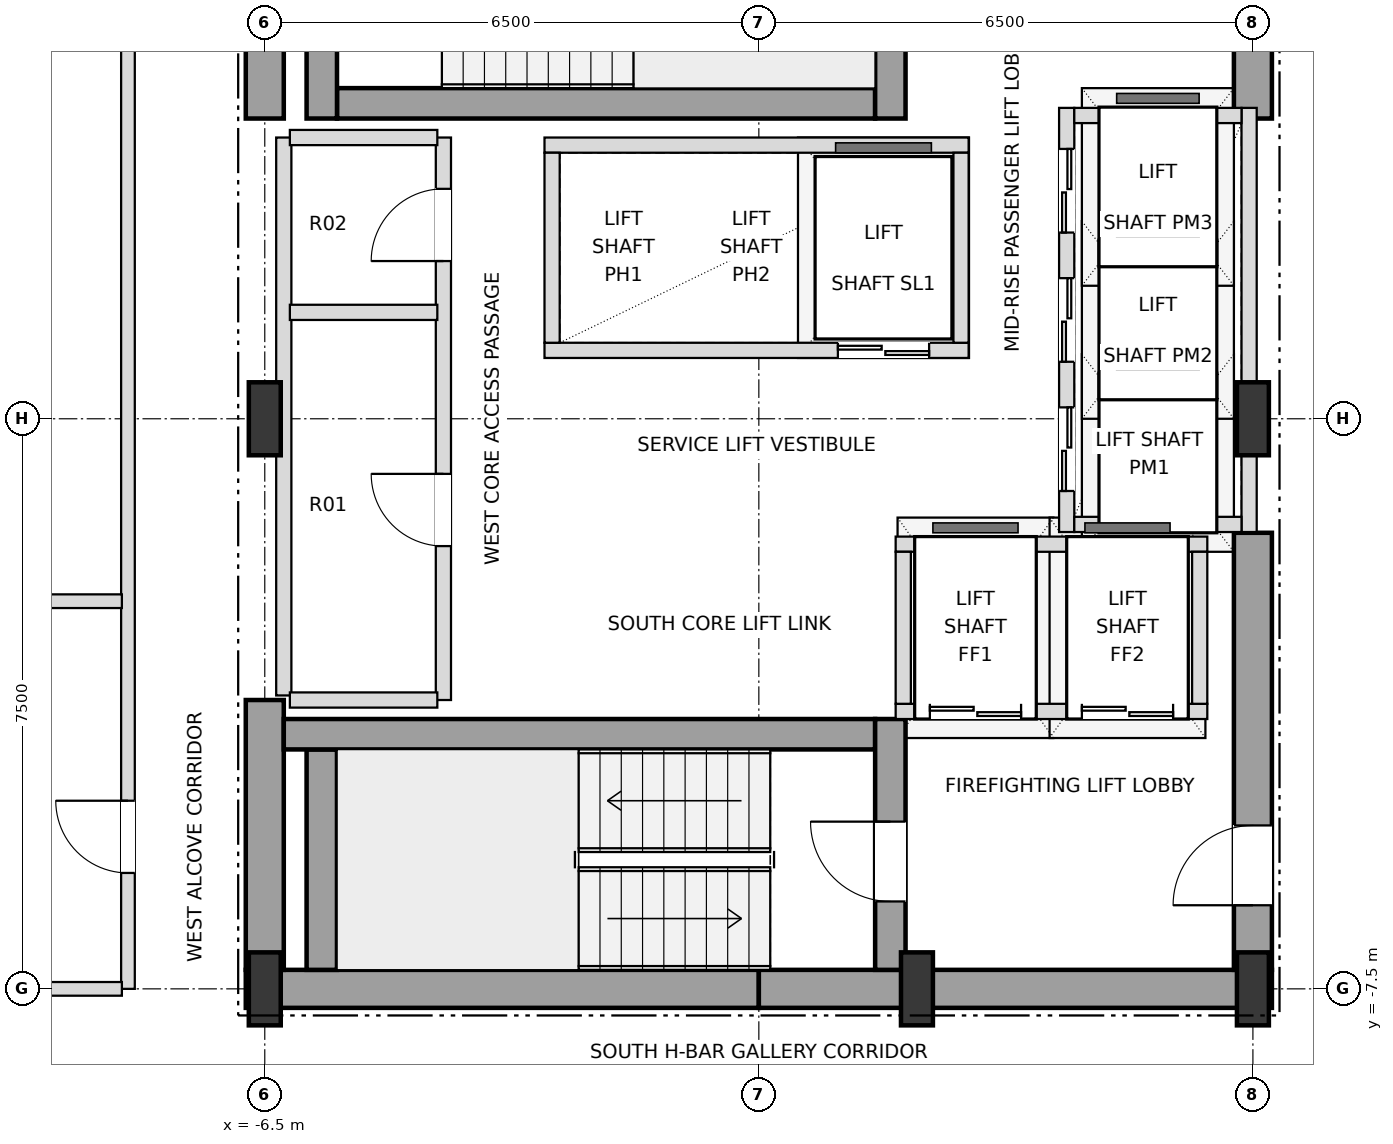
"""IFC4 building model, lengths in metres.
Left out: names, types, materials, properties, quantities, classifications, styles, units other than length and angle.
Written with IfcOpenShell. Run it as: python <this file> out.ifc"""

import sys

from ifc_helpers import new_model, si_unit, direction, frame, frame_2d, origin, origin_2d, place, context, subcontext, project, spatial, rectangle, i_section, extrude, element, fill, save


model = new_model("IFC4")
c1 = context("Model", 3, precision=1e-05, world=origin(), true_north=direction((0.0, 1.0)))
c2 = subcontext(c1, "Body", "Model", "MODEL_VIEW")
j1 = project(units=[si_unit("LENGTHUNIT", "METRE"), si_unit("PLANEANGLEUNIT", "RADIAN")], contexts=[c1])
p1 = place(None, origin())
s1 = spatial("IfcSite", under=j1, at=p1, CompositionType="ELEMENT")
p2 = place(p1, origin())
s2 = spatial("IfcBuilding", under=s1, at=p2, CompositionType="ELEMENT")
p3 = place(p2, frame((0.0, 0.0, 147.6)))
s3 = spatial("IfcBuildingStorey", under=s2, at=p3, CompositionType="ELEMENT", Elevation=147.6)
for number, where, z_axis, x_axis in (
    (1, (-6.5, -7.5, 0.0), (0.0, 0.0, 1.0), (1.0, 0.0, 0.0)),
    (2, (2.08, -7.5, 0.0), (0.0, 0.0, 1.0), (1.0, 0.0, 0.0)),
    (3, (6.5, -7.5, 0.0), (0.0, 0.0, 1.0), (1.0, 0.0, 0.0)),
    (4, (-6.5, 0.0, 0.0), (0.0, 0.0, 1.0), (1.0, 0.0, 0.0)),
    (5, (6.5, 0.0, 0.0), (0.0, 0.0, 1.0), (1.0, 0.0, 0.0)),
):
    element("IfcColumn", number, at=place(p3, frame(where, z_axis=z_axis, x_axis=x_axis)), inside=s3, PredefinedType="COLUMN", context=c2, shape_type="SweptSolid", body=[
        extrude(i_section(OverallWidth=0.42, OverallDepth=0.96, WebThickness=0.022, FlangeThickness=0.034, at=origin_2d()), origin(), (0.0, 0.0, 1.0), 3.6),
    ])
for number, where, z_axis, x_axis in (
    (6, (-6.75, -7.5, 0.0), (0.0, 0.0, 1.0), (1.0, 0.0, 0.0)),
    (7, (0.0, -7.5, 0.0), (0.0, 0.0, 1.0), (1.0, 0.0, 0.0)),
):
    element("IfcWall", number, at=place(p3, frame(where, z_axis=z_axis, x_axis=x_axis)), inside=s3, PredefinedType="SHEAR", context=c2, shape_type="SweptSolid", body=[
        extrude(rectangle(XDim=6.75, YDim=0.5, at=frame_2d((3.375, 0.0))), origin(), (0.0, 0.0, 1.0), 3.38),
    ])
p4 = place(p3, frame((-6.5, -7.25, 0.0), z_axis=(0.0, 0.0, 1.0), x_axis=(0.0, 1.0, 0.0)))
e8 = element("IfcWall", 8, at=p4, inside=s3, PredefinedType="SHEAR", context=c2, shape_type="SweptSolid", body=[
    extrude(rectangle(XDim=3.55, YDim=0.5, at=frame_2d((1.775, 0.0))), origin(), (0.0, 0.0, 1.0), 3.38),
])
p5 = place(p3, frame((-6.5, 3.95, 0.0), z_axis=(0.0, 0.0, 1.0), x_axis=(0.0, 1.0, 0.0)))
e9 = element("IfcWall", 9, at=p5, inside=s3, PredefinedType="SHEAR", context=c2, shape_type="SweptSolid", body=[
    extrude(rectangle(XDim=3.3, YDim=0.5, at=frame_2d((1.65, 0.0))), origin(), (0.0, 0.0, 1.0), 3.38),
])
p6 = place(p3, frame((6.5, -7.25, 0.0), z_axis=(0.0, 0.0, 1.0), x_axis=(0.0, 1.0, 0.0)))
e10 = element("IfcWall", 10, at=p6, inside=s3, PredefinedType="SHEAR", context=c2, shape_type="SweptSolid", body=[
    extrude(rectangle(XDim=5.75, YDim=0.5, at=frame_2d((2.875, 0.0))), origin(), (0.0, 0.0, 1.0), 3.38),
])
p7 = place(p6, frame((0.85, 0.0, 0.0)))
e11 = element("IfcOpeningElement", 11, at=p7, cuts=e10, PredefinedType="OPENING", context=c2, shape_type="SweptSolid", body=[
    extrude(rectangle(XDim=1.05, YDim=2.15, at=frame_2d((0.525, 1.075))), frame((0.0, 0.26, 0.0), z_axis=(0.0, -1.0, 0.0), x_axis=(1.0, 0.0, 0.0)), (0.0, 0.0, 1.0), 0.52),
])
p8 = place(p3, frame((6.5, 3.95, 0.0), z_axis=(0.0, 0.0, 1.0), x_axis=(0.0, 1.0, 0.0)))
e12 = element("IfcWall", 12, at=p8, inside=s3, PredefinedType="SHEAR", context=c2, shape_type="SweptSolid", body=[
    extrude(rectangle(XDim=3.3, YDim=0.5, at=frame_2d((1.65, 0.0))), origin(), (0.0, 0.0, 1.0), 3.38),
])
p9 = place(p3, frame((-5.75, -7.25, 0.0), z_axis=(0.0, 0.0, 1.0), x_axis=(0.0, 1.0, 0.0)))
e13 = element("IfcWall", 13, at=p9, inside=s3, PredefinedType="SHEAR", context=c2, shape_type="SweptSolid", body=[
    extrude(rectangle(XDim=2.9, YDim=0.4, at=frame_2d((1.45, 0.0))), origin(), (0.0, 0.0, 1.0), 3.38),
])
p10 = place(p3, frame((-6.25, -4.15, 0.0), z_axis=(0.0, 0.0, 1.0), x_axis=(1.0, 0.0, 0.0)))
e14 = element("IfcWall", 14, at=p10, inside=s3, PredefinedType="SHEAR", context=c2, shape_type="SweptSolid", body=[
    extrude(rectangle(XDim=7.78, YDim=0.4, at=frame_2d((3.89, 0.0))), origin(), (0.0, 0.0, 1.0), 3.38),
])
p11 = place(p3, frame((1.73, -7.25, 0.0), z_axis=(0.0, 0.0, 1.0), x_axis=(0.0, 1.0, 0.0)))
e15 = element("IfcWall", 15, at=p11, inside=s3, PredefinedType="SHEAR", context=c2, shape_type="SweptSolid", body=[
    extrude(rectangle(XDim=3.3, YDim=0.4, at=frame_2d((1.65, 0.0))), origin(), (0.0, 0.0, 1.0), 3.38),
])
p12 = place(p11, frame((0.9, 0.0, 0.0)))
e16 = element("IfcOpeningElement", 16, at=p12, cuts=e15, PredefinedType="OPENING", context=c2, shape_type="SweptSolid", body=[
    extrude(rectangle(XDim=1.05, YDim=2.15, at=frame_2d((0.525, 1.075))), frame((0.0, 0.21, 0.0), z_axis=(0.0, -1.0, 0.0), x_axis=(1.0, 0.0, 0.0)), (0.0, 0.0, 1.0), 0.42),
])
p13 = place(p3, frame((-5.55, 4.15, 0.0), z_axis=(0.0, 0.0, 1.0), x_axis=(1.0, 0.0, 0.0)))
e17 = element("IfcWall", 17, at=p13, inside=s3, PredefinedType="SHEAR", context=c2, shape_type="SweptSolid", body=[
    extrude(rectangle(XDim=7.08, YDim=0.4, at=frame_2d((3.54, 0.0))), origin(), (0.0, 0.0, 1.0), 3.38),
])
for number, where, z_axis, x_axis in (
    (18, (1.73, 3.95, 0.0), (0.0, 0.0, 1.0), (0.0, 1.0, 0.0)),
    (19, (-5.75, 3.95, 0.0), (0.0, 0.0, 1.0), (0.0, 1.0, 0.0)),
):
    element("IfcWall", number, at=place(p3, frame(where, z_axis=z_axis, x_axis=x_axis)), inside=s3, PredefinedType="SHEAR", context=c2, shape_type="SweptSolid", body=[
        extrude(rectangle(XDim=3.3, YDim=0.4, at=frame_2d((1.65, 0.0))), origin(), (0.0, 0.0, 1.0), 3.38),
    ])
p14 = place(p3, frame((4.05, -1.49, 0.0), z_axis=(0.0, 0.0, 1.0), x_axis=(0.0, 1.0, 0.0)))
e20 = element("IfcWall", 20, at=p14, inside=s3, PredefinedType="SOLIDWALL", context=c2, shape_type="SweptSolid", body=[
    extrude(rectangle(XDim=5.58, YDim=0.2, at=frame_2d((2.79, 0.0))), origin(), (0.0, 0.0, 1.0), 3.38),
])
p15 = place(p14, frame((0.54, 0.0, 0.0)))
e21 = element("IfcOpeningElement", 21, at=p15, cuts=e20, PredefinedType="OPENING", context=c2, shape_type="SweptSolid", body=[
    extrude(rectangle(XDim=1.1, YDim=2.15, at=frame_2d((0.55, 1.075))), frame((0.0, 0.11, 0.0), z_axis=(0.0, -1.0, 0.0), x_axis=(1.0, 0.0, 0.0)), (0.0, 0.0, 1.0), 0.22),
])
p16 = place(p14, frame((2.24, 0.0, 0.0)))
e22 = element("IfcOpeningElement", 22, at=p16, cuts=e20, PredefinedType="OPENING", context=c2, shape_type="SweptSolid", body=[
    extrude(rectangle(XDim=1.1, YDim=2.15, at=frame_2d((0.55, 1.075))), frame((0.0, 0.11, 0.0), z_axis=(0.0, -1.0, 0.0), x_axis=(1.0, 0.0, 0.0)), (0.0, 0.0, 1.0), 0.22),
])
p17 = place(p14, frame((3.94, 0.0, 0.0)))
e23 = element("IfcOpeningElement", 23, at=p17, cuts=e20, PredefinedType="OPENING", context=c2, shape_type="SweptSolid", body=[
    extrude(rectangle(XDim=1.1, YDim=2.15, at=frame_2d((0.55, 1.075))), frame((0.0, 0.11, 0.0), z_axis=(0.0, -1.0, 0.0), x_axis=(1.0, 0.0, 0.0)), (0.0, 0.0, 1.0), 0.22),
])
p18 = place(p3, frame((6.45, -1.49, 0.0), z_axis=(0.0, 0.0, 1.0), x_axis=(0.0, 1.0, 0.0)))
e24 = element("IfcWall", 24, at=p18, inside=s3, PredefinedType="SOLIDWALL", context=c2, shape_type="SweptSolid", body=[
    extrude(rectangle(XDim=5.58, YDim=0.2, at=frame_2d((2.79, 0.0))), origin(), (0.0, 0.0, 1.0), 2.816),
])
for number, where, z_axis, x_axis in (
    (25, (4.15, -1.39, 0.0), (0.0, 0.0, 1.0), (1.0, 0.0, 0.0)),
    (26, (4.15, 3.99, 0.0), (0.0, 0.0, 1.0), (1.0, 0.0, 0.0)),
):
    element("IfcWall", number, at=place(p3, frame(where, z_axis=z_axis, x_axis=x_axis)), inside=s3, PredefinedType="SOLIDWALL", context=c2, shape_type="SweptSolid", body=[
        extrude(rectangle(XDim=2.2, YDim=0.2, at=frame_2d((1.1, 0.0))), origin(), (0.0, 0.0, 1.0), 3.38),
    ])
p19 = place(p3, frame((-2.82, 0.9, 0.0), z_axis=(0.0, 0.0, 1.0), x_axis=(1.0, 0.0, 0.0)))
e27 = element("IfcWall", 27, at=p19, inside=s3, PredefinedType="SOLIDWALL", context=c2, shape_type="SweptSolid", body=[
    extrude(rectangle(XDim=5.58, YDim=0.2, at=frame_2d((2.79, 0.0))), origin(), (0.0, 0.0, 1.0), 3.38),
])
p20 = place(p19, frame((3.86, 0.0, 0.0)))
e28 = element("IfcOpeningElement", 28, at=p20, cuts=e27, PredefinedType="OPENING", context=c2, shape_type="SweptSolid", body=[
    extrude(rectangle(XDim=1.2, YDim=2.2, at=frame_2d((0.6, 1.1))), frame((0.0, 0.11, 0.0), z_axis=(0.0, -1.0, 0.0), x_axis=(1.0, 0.0, 0.0)), (0.0, 0.0, 1.0), 0.22),
])
p21 = place(p3, frame((-2.82, 3.6, 0.0), z_axis=(0.0, 0.0, 1.0), x_axis=(1.0, 0.0, 0.0)))
e29 = element("IfcWall", 29, at=p21, inside=s3, PredefinedType="SOLIDWALL", context=c2, shape_type="SweptSolid", body=[
    extrude(rectangle(XDim=5.58, YDim=0.2, at=frame_2d((2.79, 0.0))), origin(), (0.0, 0.0, 1.0), 3.38),
])
for number, where, z_axis, x_axis in (
    (30, (-2.72, 1.0, 0.0), (0.0, 0.0, 1.0), (0.0, 1.0, 0.0)),
    (31, (2.66, 1.0, 0.0), (0.0, 0.0, 1.0), (0.0, 1.0, 0.0)),
):
    element("IfcWall", number, at=place(p3, frame(where, z_axis=z_axis, x_axis=x_axis)), inside=s3, PredefinedType="SOLIDWALL", context=c2, shape_type="SweptSolid", body=[
        extrude(rectangle(XDim=2.5, YDim=0.2, at=frame_2d((1.25, 0.0))), origin(), (0.0, 0.0, 1.0), 3.38),
    ])
p22 = place(p3, frame((1.8, -3.85, 0.0), z_axis=(0.0, 0.0, 1.0), x_axis=(1.0, 0.0, 0.0)))
e32 = element("IfcWall", 32, at=p22, inside=s3, PredefinedType="SOLIDWALL", context=c2, shape_type="SweptSolid", body=[
    extrude(rectangle(XDim=4.1, YDim=0.2, at=frame_2d((2.05, 0.0))), origin(), (0.0, 0.0, 1.0), 3.38),
])
p23 = place(p22, frame((0.45, 0.0, 0.0)))
e33 = element("IfcOpeningElement", 33, at=p23, cuts=e32, PredefinedType="OPENING", context=c2, shape_type="SweptSolid", body=[
    extrude(rectangle(XDim=1.2, YDim=2.2, at=frame_2d((0.6, 1.1))), frame((0.0, 0.11, 0.0), z_axis=(0.0, -1.0, 0.0), x_axis=(1.0, 0.0, 0.0)), (0.0, 0.0, 1.0), 0.22),
])
p24 = place(p22, frame((2.45, 0.0, 0.0)))
e34 = element("IfcOpeningElement", 34, at=p24, cuts=e32, PredefinedType="OPENING", context=c2, shape_type="SweptSolid", body=[
    extrude(rectangle(XDim=1.2, YDim=2.2, at=frame_2d((0.6, 1.1))), frame((0.0, 0.11, 0.0), z_axis=(0.0, -1.0, 0.0), x_axis=(1.0, 0.0, 0.0)), (0.0, 0.0, 1.0), 0.22),
])
p25 = place(p3, frame((1.8, -1.65, 0.0), z_axis=(0.0, 0.0, 1.0), x_axis=(1.0, 0.0, 0.0)))
e35 = element("IfcWall", 35, at=p25, inside=s3, PredefinedType="SOLIDWALL", context=c2, shape_type="SweptSolid", body=[
    extrude(rectangle(XDim=4.1, YDim=0.2, at=frame_2d((2.05, 0.0))), origin(), (0.0, 0.0, 1.0), 3.38),
])
for number, where, z_axis, x_axis in (
    (36, (1.9, -3.75, 0.0), (0.0, 0.0, 1.0), (0.0, 1.0, 0.0)),
    (37, (5.8, -3.75, 0.0), (0.0, 0.0, 1.0), (0.0, 1.0, 0.0)),
):
    element("IfcWall", number, at=place(p3, frame(where, z_axis=z_axis, x_axis=x_axis)), inside=s3, PredefinedType="SOLIDWALL", context=c2, shape_type="SweptSolid", body=[
        extrude(rectangle(XDim=2.0, YDim=0.2, at=frame_2d((1.0, 0.0))), origin(), (0.0, 0.0, 1.0), 3.38),
    ])
p26 = place(p3, frame((-8.3, -7.5, 0.0), z_axis=(0.0, 0.0, 1.0), x_axis=(0.0, 1.0, 0.0)))
e38 = element("IfcWall", 38, at=p26, inside=s3, PredefinedType="PARTITIONING", context=c2, shape_type="SweptSolid", body=[
    extrude(rectangle(XDim=15.0, YDim=0.18, at=frame_2d((7.5, 0.0))), origin(), (0.0, 0.0, 1.0), 3.38),
])
p27 = place(p26, frame((1.525, 0.0, 0.0)))
e39 = element("IfcOpeningElement", 39, at=p27, cuts=e38, PredefinedType="OPENING", context=c2, shape_type="SweptSolid", body=[
    extrude(rectangle(XDim=0.95, YDim=2.15, at=frame_2d((0.475, 1.075))), frame((0.0, 0.1, 0.0), z_axis=(0.0, -1.0, 0.0), x_axis=(1.0, 0.0, 0.0)), (0.0, 0.0, 1.0), 0.2),
])
p28 = place(p3, frame((-6.25, -3.64, 0.0), z_axis=(0.0, 0.0, 1.0), x_axis=(0.0, 1.0, 0.0)))
e40 = element("IfcWall", 40, at=p28, inside=s3, PredefinedType="SOLIDWALL", context=c2, shape_type="SweptSolid", body=[
    extrude(rectangle(XDim=7.34, YDim=0.2, at=frame_2d((3.67, 0.0))), origin(), (0.0, 0.0, 1.0), 3.38),
])
p29 = place(p3, frame((-4.15, -3.7, 0.0), z_axis=(0.0, 0.0, 1.0), x_axis=(0.0, 1.0, 0.0)))
e41 = element("IfcWall", 41, at=p29, inside=s3, PredefinedType="SOLIDWALL", context=c2, shape_type="SweptSolid", body=[
    extrude(rectangle(XDim=7.4, YDim=0.2, at=frame_2d((3.7, 0.0))), origin(), (0.0, 0.0, 1.0), 3.38),
])
p30 = place(p29, frame((2.025, 0.0, 0.0)))
e42 = element("IfcOpeningElement", 42, at=p30, cuts=e41, PredefinedType="OPENING", context=c2, shape_type="SweptSolid", body=[
    extrude(rectangle(XDim=0.95, YDim=2.15, at=frame_2d((0.475, 1.075))), frame((0.0, 0.11, 0.0), z_axis=(0.0, -1.0, 0.0), x_axis=(1.0, 0.0, 0.0)), (0.0, 0.0, 1.0), 0.22),
])
p31 = place(p29, frame((5.775, 0.0, 0.0)))
e43 = element("IfcOpeningElement", 43, at=p31, cuts=e41, PredefinedType="OPENING", context=c2, shape_type="SweptSolid", body=[
    extrude(rectangle(XDim=0.95, YDim=2.15, at=frame_2d((0.475, 1.075))), frame((0.0, 0.11, 0.0), z_axis=(0.0, -1.0, 0.0), x_axis=(1.0, 0.0, 0.0)), (0.0, 0.0, 1.0), 0.22),
])
p32 = place(p3, frame((-20.15, -7.5, 0.0), z_axis=(0.0, 0.0, 1.0), x_axis=(1.0, 0.0, 0.0)))
e44 = element("IfcWall", 44, at=p32, inside=s3, PredefinedType="PARTITIONING", context=c2, shape_type="SweptSolid", body=[
    extrude(rectangle(XDim=11.77, YDim=0.18, at=frame_2d((5.885, 0.0))), origin(), (0.0, 0.0, 1.0), 2.816),
])
p33 = place(p3, frame((-6.17, -3.7, 0.0), z_axis=(0.0, 0.0, 1.0), x_axis=(1.0, 0.0, 0.0)))
e45 = element("IfcWall", 45, at=p33, inside=s3, PredefinedType="SOLIDWALL", context=c2, shape_type="SweptSolid", body=[
    extrude(rectangle(XDim=1.94, YDim=0.2, at=frame_2d((0.97, 0.0))), origin(), (0.0, 0.0, 1.0), 3.38),
])
p34 = place(p3, frame((-20.07, -2.4, 0.0), z_axis=(0.0, 0.0, 1.0), x_axis=(1.0, 0.0, 0.0)))
e46 = element("IfcWall", 46, at=p34, inside=s3, PredefinedType="PARTITIONING", context=c2, shape_type="SweptSolid", body=[
    extrude(rectangle(XDim=11.69, YDim=0.18, at=frame_2d((5.845, 0.0))), origin(), (0.0, 0.0, 1.0), 2.816),
])
p35 = place(p34, frame((5.375, 0.0, 0.0)))
e47 = element("IfcOpeningElement", 47, at=p35, cuts=e46, PredefinedType="OPENING", context=c2, shape_type="SweptSolid", body=[
    extrude(rectangle(XDim=0.95, YDim=2.15, at=frame_2d((0.475, 1.075))), frame((0.0, 0.1, 0.0), z_axis=(0.0, -1.0, 0.0), x_axis=(1.0, 0.0, 0.0)), (0.0, 0.0, 1.0), 0.2),
])
for number, where, z_axis, x_axis in (
    (48, (-6.17, 1.4, 0.0), (0.0, 0.0, 1.0), (1.0, 0.0, 0.0)),
    (49, (-6.17, 3.7, 0.0), (0.0, 0.0, 1.0), (1.0, 0.0, 0.0)),
):
    element("IfcWall", number, at=place(p3, frame(where, z_axis=z_axis, x_axis=x_axis)), inside=s3, PredefinedType="SOLIDWALL", context=c2, shape_type="SweptSolid", body=[
        extrude(rectangle(XDim=1.94, YDim=0.2, at=frame_2d((0.97, 0.0))), origin(), (0.0, 0.0, 1.0), 3.38),
    ])
p36 = place(p7, origin())
e50 = element("IfcDoor", 50, at=p36, inside=s3, OperationType="SINGLE_SWING_LEFT", PredefinedType="DOOR", context=c2, shape_type="SweptSolid", body=[
    extrude(rectangle(XDim=1.05, YDim=2.15, at=frame_2d((0.525, 1.075))), frame((0.0, 0.025, 0.0), z_axis=(0.0, -1.0, 0.0), x_axis=(1.0, 0.0, 0.0)), (0.0, 0.0, 1.0), 0.05),
])
fill(e11, e50)
p37 = place(p12, origin())
e51 = element("IfcDoor", 51, at=p37, inside=s3, OperationType="SINGLE_SWING_RIGHT", PredefinedType="DOOR", context=c2, shape_type="SweptSolid", body=[
    extrude(rectangle(XDim=1.05, YDim=2.15, at=frame_2d((0.525, 1.075))), frame((0.0, 0.025, 0.0), z_axis=(0.0, -1.0, 0.0), x_axis=(1.0, 0.0, 0.0)), (0.0, 0.0, 1.0), 0.05),
])
fill(e16, e51)
p38 = place(p15, origin())
e52 = element("IfcDoor", 52, at=p38, inside=s3, OperationType="DOUBLE_DOOR_SLIDING", PredefinedType="DOOR", context=c2, shape_type="SweptSolid", body=[
    extrude(rectangle(XDim=1.1, YDim=2.15, at=frame_2d((0.55, 1.075))), frame((0.0, 0.025, 0.0), z_axis=(0.0, -1.0, 0.0), x_axis=(1.0, 0.0, 0.0)), (0.0, 0.0, 1.0), 0.05),
])
fill(e21, e52)
p39 = place(p16, origin())
e53 = element("IfcDoor", 53, at=p39, inside=s3, OperationType="DOUBLE_DOOR_SLIDING", PredefinedType="DOOR", context=c2, shape_type="SweptSolid", body=[
    extrude(rectangle(XDim=1.1, YDim=2.15, at=frame_2d((0.55, 1.075))), frame((0.0, 0.025, 0.0), z_axis=(0.0, -1.0, 0.0), x_axis=(1.0, 0.0, 0.0)), (0.0, 0.0, 1.0), 0.05),
])
fill(e22, e53)
p40 = place(p17, origin())
e54 = element("IfcDoor", 54, at=p40, inside=s3, OperationType="DOUBLE_DOOR_SLIDING", PredefinedType="DOOR", context=c2, shape_type="SweptSolid", body=[
    extrude(rectangle(XDim=1.1, YDim=2.15, at=frame_2d((0.55, 1.075))), frame((0.0, 0.025, 0.0), z_axis=(0.0, -1.0, 0.0), x_axis=(1.0, 0.0, 0.0)), (0.0, 0.0, 1.0), 0.05),
])
fill(e23, e54)
p41 = place(p20, origin())
e55 = element("IfcDoor", 55, at=p41, inside=s3, OperationType="DOUBLE_DOOR_SLIDING", PredefinedType="DOOR", context=c2, shape_type="SweptSolid", body=[
    extrude(rectangle(XDim=1.2, YDim=2.2, at=frame_2d((0.6, 1.1))), frame((0.0, 0.025, 0.0), z_axis=(0.0, -1.0, 0.0), x_axis=(1.0, 0.0, 0.0)), (0.0, 0.0, 1.0), 0.05),
])
fill(e28, e55)
p42 = place(p23, origin())
e56 = element("IfcDoor", 56, at=p42, inside=s3, OperationType="DOUBLE_DOOR_SLIDING", PredefinedType="DOOR", context=c2, shape_type="SweptSolid", body=[
    extrude(rectangle(XDim=1.2, YDim=2.2, at=frame_2d((0.6, 1.1))), frame((0.0, 0.025, 0.0), z_axis=(0.0, -1.0, 0.0), x_axis=(1.0, 0.0, 0.0)), (0.0, 0.0, 1.0), 0.05),
])
fill(e33, e56)
p43 = place(p24, origin())
e57 = element("IfcDoor", 57, at=p43, inside=s3, OperationType="DOUBLE_DOOR_SLIDING", PredefinedType="DOOR", context=c2, shape_type="SweptSolid", body=[
    extrude(rectangle(XDim=1.2, YDim=2.2, at=frame_2d((0.6, 1.1))), frame((0.0, 0.025, 0.0), z_axis=(0.0, -1.0, 0.0), x_axis=(1.0, 0.0, 0.0)), (0.0, 0.0, 1.0), 0.05),
])
fill(e34, e57)
p44 = place(p30, origin())
e58 = element("IfcDoor", 58, at=p44, inside=s3, OperationType="SINGLE_SWING_RIGHT", PredefinedType="DOOR", context=c2, shape_type="SweptSolid", body=[
    extrude(rectangle(XDim=0.95, YDim=2.15, at=frame_2d((0.475, 1.075))), frame((0.0, 0.025, 0.0), z_axis=(0.0, -1.0, 0.0), x_axis=(1.0, 0.0, 0.0)), (0.0, 0.0, 1.0), 0.05),
])
fill(e42, e58)
p45 = place(p31, origin())
e59 = element("IfcDoor", 59, at=p45, inside=s3, OperationType="SINGLE_SWING_LEFT", PredefinedType="DOOR", context=c2, shape_type="SweptSolid", body=[
    extrude(rectangle(XDim=0.95, YDim=2.15, at=frame_2d((0.475, 1.075))), frame((0.0, 0.025, 0.0), z_axis=(0.0, -1.0, 0.0), x_axis=(1.0, 0.0, 0.0)), (0.0, 0.0, 1.0), 0.05),
])
fill(e43, e59)
p46 = place(p27, origin())
e60 = element("IfcDoor", 60, at=p46, inside=s3, OperationType="SINGLE_SWING_RIGHT", PredefinedType="DOOR", context=c2, shape_type="SweptSolid", body=[
    extrude(rectangle(XDim=0.95, YDim=2.15, at=frame_2d((0.475, 1.075))), frame((0.0, 0.025, 0.0), z_axis=(0.0, -1.0, 0.0), x_axis=(1.0, 0.0, 0.0)), (0.0, 0.0, 1.0), 0.05),
])
fill(e39, e60)
save(model, sys.argv[1])
